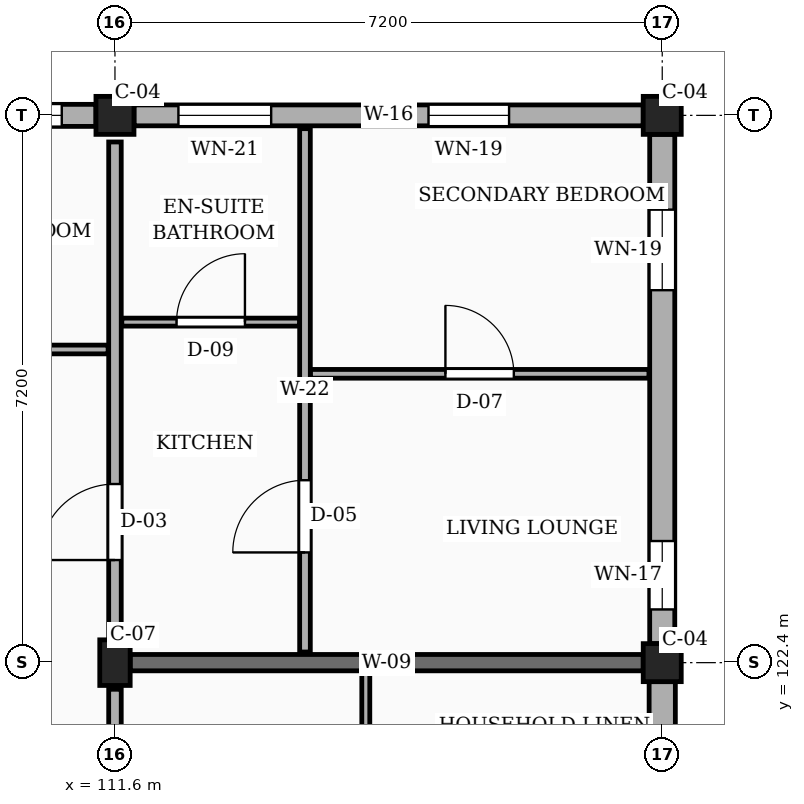
"""IFC4 building model, lengths in metres.
Left out: names, types, materials, properties, quantities, classifications, styles, units other than length and angle.
Written with IfcOpenShell. Run it as: python <this file> out.ifc"""

import sys

from ifc_helpers import new_model, si_unit, direction, frame, frame_2d, origin, origin_2d, place, context, subcontext, project, spatial, rectangle, extrude, element, fill, save


model = new_model("IFC4")
c1 = context("Model", 3, precision=1e-05, world=origin(), true_north=direction((0.0, 1.0)))
c2 = subcontext(c1, "Body", "Model", "MODEL_VIEW")
j1 = project(units=[si_unit("LENGTHUNIT", "METRE"), si_unit("PLANEANGLEUNIT", "RADIAN")], contexts=[c1])
p1 = place(None, origin())
s1 = spatial("IfcSite", under=j1, at=p1, CompositionType="ELEMENT")
p2 = place(p1, origin())
s2 = spatial("IfcBuilding", under=s1, at=p2, CompositionType="ELEMENT")
p3 = place(p2, frame((0.0, 0.0, 29.7)))
s3 = spatial("IfcBuildingStorey", under=s2, at=p3, CompositionType="ELEMENT", Elevation=29.7)
p4 = place(p3, frame((111.6, 122.4, 0.0), z_axis=(0.0, 0.0, 1.0), x_axis=(1.0, 0.0, 0.0)))
e1 = element("IfcColumn", 1, at=p4, inside=s3, PredefinedType="COLUMN", context=c2, shape_type="SweptSolid", body=[
    extrude(rectangle(XDim=0.4, YDim=0.6, at=origin_2d()), origin(), (0.0, 0.0, 1.0), 3.15),
])
for number, where, z_axis, x_axis in (
    (2, (111.6, 129.6, 0.0), (0.0, 0.0, 1.0), (1.0, 0.0, 0.0)),
    (3, (118.8, 122.4, 0.0), (0.0, 0.0, 1.0), (1.0, 0.0, 0.0)),
    (4, (118.8, 129.6, 0.0), (0.0, 0.0, 1.0), (1.0, 0.0, 0.0)),
):
    element("IfcColumn", number, at=place(p3, frame(where, z_axis=z_axis, x_axis=x_axis)), inside=s3, PredefinedType="COLUMN", context=c2, shape_type="SweptSolid", body=[
        extrude(rectangle(XDim=0.5, YDim=0.5, at=origin_2d()), origin(), (0.0, 0.0, 1.0), 3.15),
    ])
p5 = place(p3, frame((111.8, 122.4, 0.0), z_axis=(0.0, 0.0, 1.0), x_axis=(1.0, 0.0, 0.0)))
e5 = element("IfcWall", 5, at=p5, inside=s3, PredefinedType="SOLIDWALL", context=c2, shape_type="SweptSolid", body=[
    extrude(rectangle(XDim=6.75, YDim=0.215, at=frame_2d((3.375, 0.0))), origin(), (0.0, 0.0, 1.0), 2.19),
])
p6 = place(p3, frame((118.8, 115.45, 0.0), z_axis=(0.0, 0.0, 1.0), x_axis=(0.0, 1.0, 0.0)))
e6 = element("IfcWall", 6, at=p6, inside=s3, PredefinedType="SOLIDWALL", context=c2, shape_type="SweptSolid", body=[
    extrude(rectangle(XDim=6.7, YDim=0.345, at=frame_2d((3.35, 0.0))), origin(), (0.0, 0.0, 1.0), 2.46),
])
p7 = place(p6, frame((0.45, 0.0, 0.78)))
e7 = element("IfcOpeningElement", 7, at=p7, cuts=e6, PredefinedType="OPENING", context=c2, shape_type="SweptSolid", body=[
    extrude(rectangle(XDim=1.36, YDim=1.26, at=frame_2d((0.68, 0.63))), frame((0.0, 0.183, 0.0), z_axis=(0.0, -1.0, 0.0), x_axis=(1.0, 0.0, 0.0)), (0.0, 0.0, 1.0), 0.365),
])
p8 = place(p6, frame((4.65, 0.0, 0.78)))
e8 = element("IfcOpeningElement", 8, at=p8, cuts=e6, PredefinedType="OPENING", context=c2, shape_type="SweptSolid", body=[
    extrude(rectangle(XDim=0.9, YDim=1.36, at=frame_2d((0.45, 0.68))), frame((0.0, 0.183, 0.0), z_axis=(0.0, -1.0, 0.0), x_axis=(1.0, 0.0, 0.0)), (0.0, 0.0, 1.0), 0.365),
])
p9 = place(p3, frame((118.8, 122.65, 0.0), z_axis=(0.0, 0.0, 1.0), x_axis=(0.0, 1.0, 0.0)))
e9 = element("IfcWall", 9, at=p9, inside=s3, PredefinedType="SOLIDWALL", context=c2, shape_type="SweptSolid", body=[
    extrude(rectangle(XDim=6.7, YDim=0.33, at=frame_2d((3.35, 0.0))), origin(), (0.0, 0.0, 1.0), 2.46),
])
p10 = place(p9, frame((0.45, 0.0, 0.78)))
e10 = element("IfcOpeningElement", 10, at=p10, cuts=e9, PredefinedType="OPENING", context=c2, shape_type="SweptSolid", body=[
    extrude(rectangle(XDim=0.9, YDim=1.36, at=frame_2d((0.45, 0.68))), frame((0.0, 0.175, 0.0), z_axis=(0.0, -1.0, 0.0), x_axis=(1.0, 0.0, 0.0)), (0.0, 0.0, 1.0), 0.35),
])
p11 = place(p9, frame((4.65, 0.0, 0.78)))
e11 = element("IfcOpeningElement", 11, at=p11, cuts=e9, PredefinedType="OPENING", context=c2, shape_type="SweptSolid", body=[
    extrude(rectangle(XDim=1.06, YDim=1.36, at=frame_2d((0.53, 0.68))), frame((0.0, 0.175, 0.0), z_axis=(0.0, -1.0, 0.0), x_axis=(1.0, 0.0, 0.0)), (0.0, 0.0, 1.0), 0.35),
])
p12 = place(p3, frame((118.55, 129.6, 0.0), z_axis=(0.0, 0.0, 1.0), x_axis=(-1.0, 0.0, 0.0)))
e12 = element("IfcWall", 12, at=p12, inside=s3, PredefinedType="SOLIDWALL", context=c2, shape_type="SweptSolid", body=[
    extrude(rectangle(XDim=6.7, YDim=0.275, at=frame_2d((3.35, 0.0))), origin(), (0.0, 0.0, 1.0), 2.46),
])
p13 = place(p12, frame((1.765, 0.0, 0.78)))
e13 = element("IfcOpeningElement", 13, at=p13, cuts=e12, PredefinedType="OPENING", context=c2, shape_type="SweptSolid", body=[
    extrude(rectangle(XDim=1.06, YDim=1.36, at=frame_2d((0.53, 0.68))), frame((0.0, 0.147, 0.0), z_axis=(0.0, -1.0, 0.0), x_axis=(1.0, 0.0, 0.0)), (0.0, 0.0, 1.0), 0.295),
])
p14 = place(p12, frame((4.895, 0.0, 0.78)))
e14 = element("IfcOpeningElement", 14, at=p14, cuts=e12, PredefinedType="OPENING", context=c2, shape_type="SweptSolid", body=[
    extrude(rectangle(XDim=1.22, YDim=1.36, at=frame_2d((0.61, 0.68))), frame((0.0, 0.147, 0.0), z_axis=(0.0, -1.0, 0.0), x_axis=(1.0, 0.0, 0.0)), (0.0, 0.0, 1.0), 0.295),
])
p15 = place(p3, frame((111.35, 129.6, 0.0), z_axis=(0.0, 0.0, 1.0), x_axis=(-1.0, 0.0, 0.0)))
e15 = element("IfcWall", 15, at=p15, inside=s3, PredefinedType="SOLIDWALL", context=c2, shape_type="SweptSolid", body=[
    extrude(rectangle(XDim=6.7, YDim=0.29, at=frame_2d((3.35, 0.0))), origin(), (0.0, 0.0, 1.0), 2.46),
])
p16 = place(p15, frame((0.45, 0.0, 0.78)))
e16 = element("IfcOpeningElement", 16, at=p16, cuts=e15, PredefinedType="OPENING", context=c2, shape_type="SweptSolid", body=[
    extrude(rectangle(XDim=1.22, YDim=1.36, at=frame_2d((0.61, 0.68))), frame((0.0, 0.155, 0.0), z_axis=(0.0, -1.0, 0.0), x_axis=(1.0, 0.0, 0.0)), (0.0, 0.0, 1.0), 0.31),
])
p17 = place(p15, frame((4.65, 0.0, 0.78)))
e17 = element("IfcOpeningElement", 17, at=p17, cuts=e15, PredefinedType="OPENING", context=c2, shape_type="SweptSolid", body=[
    extrude(rectangle(XDim=1.38, YDim=1.36, at=frame_2d((0.69, 0.68))), frame((0.0, 0.155, 0.0), z_axis=(0.0, -1.0, 0.0), x_axis=(1.0, 0.0, 0.0)), (0.0, 0.0, 1.0), 0.31),
])
p18 = place(p3, frame((111.6, 115.55, 0.0), z_axis=(0.0, 0.0, 1.0), x_axis=(0.0, 1.0, 0.0)))
e18 = element("IfcWall", 18, at=p18, inside=s3, PredefinedType="PARTITIONING", context=c2, shape_type="SweptSolid", body=[
    extrude(rectangle(XDim=6.5, YDim=0.165, at=frame_2d((3.25, 0.0))), origin(), (0.0, 0.0, 1.0), 2.325),
])
p19 = place(p18, frame((1.1, 0.0, 0.0)))
e19 = element("IfcOpeningElement", 19, at=p19, cuts=e18, PredefinedType="OPENING", context=c2, shape_type="SweptSolid", body=[
    extrude(rectangle(XDim=1.14, YDim=2.18, at=frame_2d((0.57, 1.09))), frame((0.0, 0.093, 0.0), z_axis=(0.0, -1.0, 0.0), x_axis=(1.0, 0.0, 0.0)), (0.0, 0.0, 1.0), 0.185),
])
p20 = place(p3, frame((111.6, 122.75, 0.0), z_axis=(0.0, 0.0, 1.0), x_axis=(0.0, 1.0, 0.0)))
e20 = element("IfcWall", 20, at=p20, inside=s3, PredefinedType="PARTITIONING", context=c2, shape_type="SweptSolid", body=[
    extrude(rectangle(XDim=6.5, YDim=0.165, at=frame_2d((3.25, 0.0))), origin(), (0.0, 0.0, 1.0), 2.325),
])
p21 = place(p20, frame((1.0, 0.0, 0.0)))
e21 = element("IfcOpeningElement", 21, at=p21, cuts=e20, PredefinedType="OPENING", context=c2, shape_type="SweptSolid", body=[
    extrude(rectangle(XDim=1.0, YDim=2.15, at=frame_2d((0.5, 1.075))), frame((0.0, 0.093, 0.0), z_axis=(0.0, -1.0, 0.0), x_axis=(1.0, 0.0, 0.0)), (0.0, 0.0, 1.0), 0.185),
])
p22 = place(p3, frame((114.9, 119.07, 0.0), z_axis=(0.0, 0.0, 1.0), x_axis=(0.0, 1.0, 0.0)))
e22 = element("IfcWall", 22, at=p22, inside=s3, PredefinedType="PARTITIONING", context=c2, shape_type="SweptSolid", body=[
    extrude(rectangle(XDim=3.19, YDim=0.105, at=frame_2d((1.595, 0.0))), origin(), (0.0, 0.0, 1.0), 2.325),
])
p23 = place(p3, frame((104.49, 126.52, 0.0), z_axis=(0.0, 0.0, 1.0), x_axis=(1.0, 0.0, 0.0)))
e23 = element("IfcWall", 23, at=p23, inside=s3, PredefinedType="PARTITIONING", context=c2, shape_type="SweptSolid", body=[
    extrude(rectangle(XDim=7.02, YDim=0.115, at=frame_2d((3.51, 0.0))), origin(), (0.0, 0.0, 1.0), 2.325),
])
p24 = place(p23, frame((2.85, 0.0, 0.0)))
e24 = element("IfcOpeningElement", 24, at=p24, cuts=e23, PredefinedType="OPENING", context=c2, shape_type="SweptSolid", body=[
    extrude(rectangle(XDim=1.02, YDim=2.15, at=frame_2d((0.51, 1.075))), frame((0.0, 0.067, 0.0), z_axis=(0.0, -1.0, 0.0), x_axis=(1.0, 0.0, 0.0)), (0.0, 0.0, 1.0), 0.135),
])
p25 = place(p3, frame((114.17, 126.2, 0.0), z_axis=(0.0, 0.0, 1.0), x_axis=(1.0, 0.0, 0.0)))
e25 = element("IfcWall", 25, at=p25, inside=s3, PredefinedType="PARTITIONING", context=c2, shape_type="SweptSolid", body=[
    extrude(rectangle(XDim=4.455, YDim=0.115, at=frame_2d((2.228, 0.0))), origin(), (0.0, 0.0, 1.0), 2.325),
])
p26 = place(p25, frame((1.778, 0.0, 0.0)))
e26 = element("IfcOpeningElement", 26, at=p26, cuts=e25, PredefinedType="OPENING", context=c2, shape_type="SweptSolid", body=[
    extrude(rectangle(XDim=0.9, YDim=2.1, at=frame_2d((0.45, 1.05))), frame((0.0, 0.067, 0.0), z_axis=(0.0, -1.0, 0.0), x_axis=(1.0, 0.0, 0.0)), (0.0, 0.0, 1.0), 0.135),
])
p27 = place(p3, frame((111.69, 126.88, 0.0), z_axis=(0.0, 0.0, 1.0), x_axis=(1.0, 0.0, 0.0)))
e27 = element("IfcWall", 27, at=p27, inside=s3, PredefinedType="PARTITIONING", context=c2, shape_type="SweptSolid", body=[
    extrude(rectangle(XDim=2.34, YDim=0.105, at=frame_2d((1.17, 0.0))), origin(), (0.0, 0.0, 1.0), 2.325),
])
p28 = place(p27, frame((0.72, 0.0, 0.0)))
e28 = element("IfcOpeningElement", 28, at=p28, cuts=e27, PredefinedType="OPENING", context=c2, shape_type="SweptSolid", body=[
    extrude(rectangle(XDim=0.9, YDim=2.05, at=frame_2d((0.45, 1.025))), frame((0.0, 0.062, 0.0), z_axis=(0.0, -1.0, 0.0), x_axis=(1.0, 0.0, 0.0)), (0.0, 0.0, 1.0), 0.125),
])
p29 = place(p3, frame((114.1, 122.54, 0.0), z_axis=(0.0, 0.0, 1.0), x_axis=(0.0, 1.0, 0.0)))
e29 = element("IfcWall", 29, at=p29, inside=s3, PredefinedType="PARTITIONING", context=c2, shape_type="SweptSolid", body=[
    extrude(rectangle(XDim=6.885, YDim=0.14, at=frame_2d((3.442, 0.0))), origin(), (0.0, 0.0, 1.0), 2.325),
])
p30 = place(p29, frame((1.31, 0.0, 0.0)))
e30 = element("IfcOpeningElement", 30, at=p30, cuts=e29, PredefinedType="OPENING", context=c2, shape_type="SweptSolid", body=[
    extrude(rectangle(XDim=0.95, YDim=2.1, at=frame_2d((0.475, 1.05))), frame((0.0, 0.08, 0.0), z_axis=(0.0, -1.0, 0.0), x_axis=(1.0, 0.0, 0.0)), (0.0, 0.0, 1.0), 0.16),
])
p31 = place(p10, origin())
e31 = element("IfcWindow", 31, at=p31, inside=s3, PartitioningType="SINGLE_PANEL", PredefinedType="WINDOW", context=c2, shape_type="SweptSolid", body=[
    extrude(rectangle(XDim=0.9, YDim=1.36, at=frame_2d((0.45, 0.68))), frame((0.0, 0.03, 0.0), z_axis=(0.0, -1.0, 0.0), x_axis=(1.0, 0.0, 0.0)), (0.0, 0.0, 1.0), 0.06),
])
fill(e10, e31)
p32 = place(p11, origin())
e32 = element("IfcWindow", 32, at=p32, inside=s3, PartitioningType="SINGLE_PANEL", PredefinedType="WINDOW", context=c2, shape_type="SweptSolid", body=[
    extrude(rectangle(XDim=1.06, YDim=1.36, at=frame_2d((0.53, 0.68))), frame((0.0, 0.03, 0.0), z_axis=(0.0, -1.0, 0.0), x_axis=(1.0, 0.0, 0.0)), (0.0, 0.0, 1.0), 0.06),
])
fill(e11, e32)
p33 = place(p13, origin())
e33 = element("IfcWindow", 33, at=p33, inside=s3, PartitioningType="SINGLE_PANEL", PredefinedType="WINDOW", context=c2, shape_type="SweptSolid", body=[
    extrude(rectangle(XDim=1.06, YDim=1.36, at=frame_2d((0.53, 0.68))), frame((0.0, 0.03, 0.0), z_axis=(0.0, -1.0, 0.0), x_axis=(1.0, 0.0, 0.0)), (0.0, 0.0, 1.0), 0.06),
])
fill(e13, e33)
p34 = place(p14, origin())
e34 = element("IfcWindow", 34, at=p34, inside=s3, PartitioningType="SINGLE_PANEL", PredefinedType="WINDOW", context=c2, shape_type="SweptSolid", body=[
    extrude(rectangle(XDim=1.22, YDim=1.36, at=frame_2d((0.61, 0.68))), frame((0.0, 0.03, 0.0), z_axis=(0.0, -1.0, 0.0), x_axis=(1.0, 0.0, 0.0)), (0.0, 0.0, 1.0), 0.06),
])
fill(e14, e34)
p35 = place(p16, origin())
e35 = element("IfcWindow", 35, at=p35, inside=s3, PartitioningType="SINGLE_PANEL", PredefinedType="WINDOW", context=c2, shape_type="SweptSolid", body=[
    extrude(rectangle(XDim=1.22, YDim=1.36, at=frame_2d((0.61, 0.68))), frame((0.0, 0.03, 0.0), z_axis=(0.0, -1.0, 0.0), x_axis=(1.0, 0.0, 0.0)), (0.0, 0.0, 1.0), 0.06),
])
fill(e16, e35)
p36 = place(p21, origin())
e36 = element("IfcDoor", 36, at=p36, inside=s3, OperationType="SINGLE_SWING_LEFT", PredefinedType="DOOR", context=c2, shape_type="SweptSolid", body=[
    extrude(rectangle(XDim=1.0, YDim=2.15, at=frame_2d((0.5, 1.075))), frame((0.0, 0.025, 0.0), z_axis=(0.0, -1.0, 0.0), x_axis=(1.0, 0.0, 0.0)), (0.0, 0.0, 1.0), 0.05),
])
fill(e21, e36)
p37 = place(p26, origin())
e37 = element("IfcDoor", 37, at=p37, inside=s3, OperationType="SINGLE_SWING_LEFT", PredefinedType="DOOR", context=c2, shape_type="SweptSolid", body=[
    extrude(rectangle(XDim=0.9, YDim=2.1, at=frame_2d((0.45, 1.05))), frame((0.0, 0.025, 0.0), z_axis=(0.0, -1.0, 0.0), x_axis=(1.0, 0.0, 0.0)), (0.0, 0.0, 1.0), 0.05),
])
fill(e26, e37)
p38 = place(p28, origin())
e38 = element("IfcDoor", 38, at=p38, inside=s3, OperationType="SINGLE_SWING_RIGHT", PredefinedType="DOOR", context=c2, shape_type="SweptSolid", body=[
    extrude(rectangle(XDim=0.9, YDim=2.05, at=frame_2d((0.45, 1.025))), frame((0.0, 0.025, 0.0), z_axis=(0.0, -1.0, 0.0), x_axis=(1.0, 0.0, 0.0)), (0.0, 0.0, 1.0), 0.05),
])
fill(e28, e38)
p39 = place(p30, origin())
e39 = element("IfcDoor", 39, at=p39, inside=s3, OperationType="SINGLE_SWING_LEFT", PredefinedType="DOOR", context=c2, shape_type="SweptSolid", body=[
    extrude(rectangle(XDim=0.95, YDim=2.1, at=frame_2d((0.475, 1.05))), frame((0.0, 0.025, 0.0), z_axis=(0.0, -1.0, 0.0), x_axis=(1.0, 0.0, 0.0)), (0.0, 0.0, 1.0), 0.05),
])
fill(e30, e39)
save(model, sys.argv[1])
